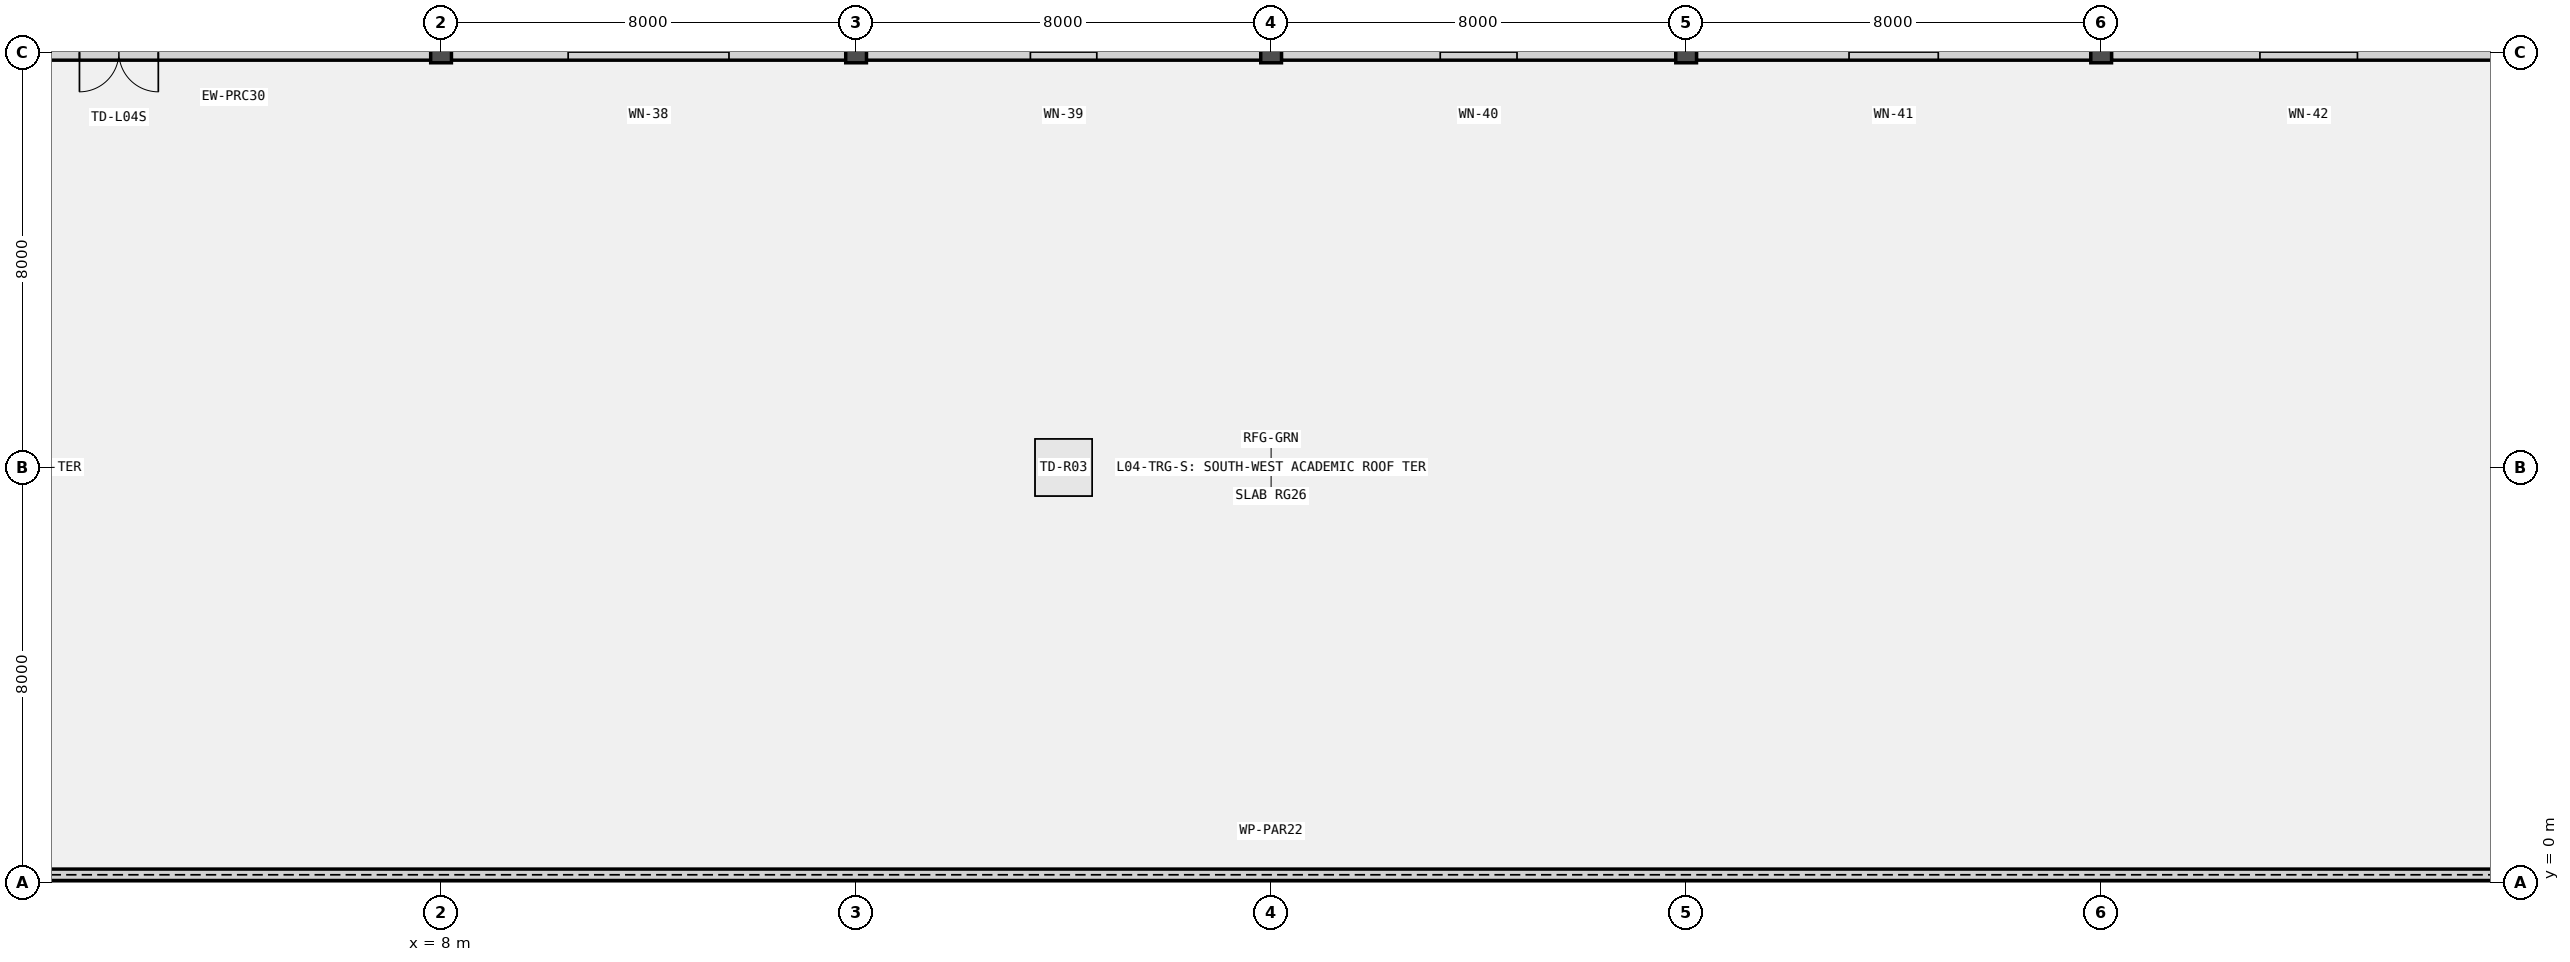
"""IFC4 building model, lengths in metres.
Left out: names, types, materials, properties, quantities, classifications, styles, units other than length and angle.
Written with IfcOpenShell. Run it as: python <this file> out.ifc"""

import sys

from ifc_helpers import new_model, si_unit, direction, frame, frame_2d, origin, origin_2d, place, context, subcontext, project, spatial, rectangle, extrude, element, fill, save


model = new_model("IFC4")
c1 = context("Model", 3, precision=1e-05, world=origin(), true_north=direction((0.0, 1.0)))
c2 = subcontext(c1, "Body", "Model", "MODEL_VIEW")
j1 = project(units=[si_unit("LENGTHUNIT", "METRE"), si_unit("PLANEANGLEUNIT", "RADIAN")], contexts=[c1])
p1 = place(None, origin())
s1 = spatial("IfcSite", under=j1, at=p1, CompositionType="ELEMENT")
p2 = place(p1, origin())
s2 = spatial("IfcBuilding", under=s1, at=p2, CompositionType="ELEMENT")
p3 = place(p2, frame((0.0, 0.0, 18.0)))
s3 = spatial("IfcBuildingStorey", under=s2, at=p3, CompositionType="ELEMENT", Elevation=18.0)
for number, where, z_axis, x_axis in (
    (1, (8.0, 16.0, 0.0), (0.0, 0.0, 1.0), (1.0, 0.0, 0.0)),
    (2, (16.0, 16.0, 0.0), (0.0, 0.0, 1.0), (1.0, 0.0, 0.0)),
    (3, (24.0, 16.0, 0.0), (0.0, 0.0, 1.0), (1.0, 0.0, 0.0)),
    (4, (32.0, 16.0, 0.0), (0.0, 0.0, 1.0), (1.0, 0.0, 0.0)),
    (5, (40.0, 16.0, 0.0), (0.0, 0.0, 1.0), (1.0, 0.0, 0.0)),
):
    element("IfcColumn", number, at=place(p3, frame(where, z_axis=z_axis, x_axis=x_axis)), inside=s3, PredefinedType="COLUMN", context=c2, shape_type="SweptSolid", body=[
        extrude(rectangle(XDim=0.4, YDim=0.4, at=origin_2d()), origin(), (0.0, 0.0, 1.0), 3.6),
    ])
p4 = place(p3, frame((7.802, 16.0, 0.0), z_axis=(0.0, 0.0, 1.0), x_axis=(-1.0, 0.0, 0.0)))
e6 = element("IfcWall", 6, at=p4, inside=s3, PredefinedType="SOLIDWALL", context=c2, shape_type="SweptSolid", body=[
    extrude(rectangle(XDim=7.604, YDim=0.3, at=frame_2d((3.802, 0.0))), origin(), (0.0, 0.0, 1.0), 2.82),
])
p5 = place(p4, frame((5.252, 0.0, 0.0)))
e7 = element("IfcOpeningElement", 7, at=p5, cuts=e6, PredefinedType="OPENING", context=c2, shape_type="SweptSolid", body=[
    extrude(rectangle(XDim=1.52, YDim=2.2, at=frame_2d((0.76, 1.1))), frame((0.0, 0.16, 0.0), z_axis=(0.0, -1.0, 0.0), x_axis=(1.0, 0.0, 0.0)), (0.0, 0.0, 1.0), 0.32),
])
p6 = place(p3, frame((15.802, 16.0, 0.0), z_axis=(0.0, 0.0, 1.0), x_axis=(-1.0, 0.0, 0.0)))
e8 = element("IfcWall", 8, at=p6, inside=s3, PredefinedType="SOLIDWALL", context=c2, shape_type="SweptSolid", body=[
    extrude(rectangle(XDim=7.604, YDim=0.3, at=frame_2d((3.802, 0.0))), origin(), (0.0, 0.0, 1.0), 2.82),
])
p7 = place(p6, frame((2.252, 0.0, 0.88)))
e9 = element("IfcOpeningElement", 9, at=p7, cuts=e8, PredefinedType="OPENING", context=c2, shape_type="SweptSolid", body=[
    extrude(rectangle(XDim=3.1, YDim=1.6, at=frame_2d((1.55, 0.8))), frame((0.0, 0.16, 0.0), z_axis=(0.0, -1.0, 0.0), x_axis=(1.0, 0.0, 0.0)), (0.0, 0.0, 1.0), 0.32),
])
p8 = place(p3, frame((23.802, 16.0, 0.0), z_axis=(0.0, 0.0, 1.0), x_axis=(-1.0, 0.0, 0.0)))
e10 = element("IfcWall", 10, at=p8, inside=s3, PredefinedType="SOLIDWALL", context=c2, shape_type="SweptSolid", body=[
    extrude(rectangle(XDim=7.604, YDim=0.3, at=frame_2d((3.802, 0.0))), origin(), (0.0, 0.0, 1.0), 2.82),
])
p9 = place(p8, frame((3.162, 0.0, 0.88)))
e11 = element("IfcOpeningElement", 11, at=p9, cuts=e10, PredefinedType="OPENING", context=c2, shape_type="SweptSolid", body=[
    extrude(rectangle(XDim=1.28, YDim=1.52, at=frame_2d((0.64, 0.76))), frame((0.0, 0.16, 0.0), z_axis=(0.0, -1.0, 0.0), x_axis=(1.0, 0.0, 0.0)), (0.0, 0.0, 1.0), 0.32),
])
p10 = place(p3, frame((31.802, 16.0, 0.0), z_axis=(0.0, 0.0, 1.0), x_axis=(-1.0, 0.0, 0.0)))
e12 = element("IfcWall", 12, at=p10, inside=s3, PredefinedType="SOLIDWALL", context=c2, shape_type="SweptSolid", body=[
    extrude(rectangle(XDim=7.604, YDim=0.3, at=frame_2d((3.802, 0.0))), origin(), (0.0, 0.0, 1.0), 2.82),
])
p11 = place(p10, frame((3.062, 0.0, 0.88)))
e13 = element("IfcOpeningElement", 13, at=p11, cuts=e12, PredefinedType="OPENING", context=c2, shape_type="SweptSolid", body=[
    extrude(rectangle(XDim=1.48, YDim=1.58, at=frame_2d((0.74, 0.79))), frame((0.0, 0.16, 0.0), z_axis=(0.0, -1.0, 0.0), x_axis=(1.0, 0.0, 0.0)), (0.0, 0.0, 1.0), 0.32),
])
p12 = place(p3, frame((39.802, 16.0, 0.0), z_axis=(0.0, 0.0, 1.0), x_axis=(-1.0, 0.0, 0.0)))
e14 = element("IfcWall", 14, at=p12, inside=s3, PredefinedType="SOLIDWALL", context=c2, shape_type="SweptSolid", body=[
    extrude(rectangle(XDim=7.604, YDim=0.3, at=frame_2d((3.802, 0.0))), origin(), (0.0, 0.0, 1.0), 2.82),
])
p13 = place(p12, frame((2.942, 0.0, 0.88)))
e15 = element("IfcOpeningElement", 15, at=p13, cuts=e14, PredefinedType="OPENING", context=c2, shape_type="SweptSolid", body=[
    extrude(rectangle(XDim=1.72, YDim=1.62, at=frame_2d((0.86, 0.81))), frame((0.0, 0.16, 0.0), z_axis=(0.0, -1.0, 0.0), x_axis=(1.0, 0.0, 0.0)), (0.0, 0.0, 1.0), 0.32),
])
p14 = place(p3, frame((47.802, 16.0, 0.0), z_axis=(0.0, 0.0, 1.0), x_axis=(-1.0, 0.0, 0.0)))
e16 = element("IfcWall", 16, at=p14, inside=s3, PredefinedType="SOLIDWALL", context=c2, shape_type="SweptSolid", body=[
    extrude(rectangle(XDim=7.604, YDim=0.3, at=frame_2d((3.802, 0.0))), origin(), (0.0, 0.0, 1.0), 2.82),
])
p15 = place(p14, frame((2.862, 0.0, 0.88)))
e17 = element("IfcOpeningElement", 17, at=p15, cuts=e16, PredefinedType="OPENING", context=c2, shape_type="SweptSolid", body=[
    extrude(rectangle(XDim=1.88, YDim=1.68, at=frame_2d((0.94, 0.84))), frame((0.0, 0.16, 0.0), z_axis=(0.0, -1.0, 0.0), x_axis=(1.0, 0.0, 0.0)), (0.0, 0.0, 1.0), 0.32),
])
p16 = place(p3, frame((47.85, 0.15, 0.0), z_axis=(0.0, 0.0, 1.0), x_axis=(-1.0, 0.0, 0.0)))
e18 = element("IfcWall", 18, at=p16, inside=s3, PredefinedType="PARAPET", context=c2, shape_type="SweptSolid", body=[
    extrude(rectangle(XDim=47.7, YDim=0.22, at=frame_2d((23.85, 0.0))), origin(), (0.0, 0.0, 1.0), 1.15),
])
p17 = place(p5, origin())
e19 = element("IfcDoor", 19, at=p17, inside=s3, OperationType="DOUBLE_DOOR_SINGLE_SWING", PredefinedType="DOOR", context=c2, shape_type="SweptSolid", body=[
    extrude(rectangle(XDim=1.52, YDim=2.2, at=frame_2d((0.76, 1.1))), frame((0.0, 0.025, 0.0), z_axis=(0.0, -1.0, 0.0), x_axis=(1.0, 0.0, 0.0)), (0.0, 0.0, 1.0), 0.05),
])
fill(e7, e19)
p18 = place(p7, origin())
e20 = element("IfcWindow", 20, at=p18, inside=s3, PartitioningType="SINGLE_PANEL", PredefinedType="WINDOW", context=c2, shape_type="SweptSolid", body=[
    extrude(rectangle(XDim=3.1, YDim=1.6, at=frame_2d((1.55, 0.8))), frame((0.0, 0.03, 0.0), z_axis=(0.0, -1.0, 0.0), x_axis=(1.0, 0.0, 0.0)), (0.0, 0.0, 1.0), 0.06),
])
fill(e9, e20)
p19 = place(p9, origin())
e21 = element("IfcWindow", 21, at=p19, inside=s3, PartitioningType="SINGLE_PANEL", PredefinedType="WINDOW", context=c2, shape_type="SweptSolid", body=[
    extrude(rectangle(XDim=1.28, YDim=1.52, at=frame_2d((0.64, 0.76))), frame((0.0, 0.03, 0.0), z_axis=(0.0, -1.0, 0.0), x_axis=(1.0, 0.0, 0.0)), (0.0, 0.0, 1.0), 0.06),
])
fill(e11, e21)
p20 = place(p11, origin())
e22 = element("IfcWindow", 22, at=p20, inside=s3, PartitioningType="SINGLE_PANEL", PredefinedType="WINDOW", context=c2, shape_type="SweptSolid", body=[
    extrude(rectangle(XDim=1.48, YDim=1.58, at=frame_2d((0.74, 0.79))), frame((0.0, 0.03, 0.0), z_axis=(0.0, -1.0, 0.0), x_axis=(1.0, 0.0, 0.0)), (0.0, 0.0, 1.0), 0.06),
])
fill(e13, e22)
p21 = place(p13, origin())
e23 = element("IfcWindow", 23, at=p21, inside=s3, PartitioningType="SINGLE_PANEL", PredefinedType="WINDOW", context=c2, shape_type="SweptSolid", body=[
    extrude(rectangle(XDim=1.72, YDim=1.62, at=frame_2d((0.86, 0.81))), frame((0.0, 0.03, 0.0), z_axis=(0.0, -1.0, 0.0), x_axis=(1.0, 0.0, 0.0)), (0.0, 0.0, 1.0), 0.06),
])
fill(e15, e23)
p22 = place(p15, origin())
e24 = element("IfcWindow", 24, at=p22, inside=s3, PartitioningType="SINGLE_PANEL", PredefinedType="WINDOW", context=c2, shape_type="SweptSolid", body=[
    extrude(rectangle(XDim=1.88, YDim=1.68, at=frame_2d((0.94, 0.84))), frame((0.0, 0.03, 0.0), z_axis=(0.0, -1.0, 0.0), x_axis=(1.0, 0.0, 0.0)), (0.0, 0.0, 1.0), 0.06),
])
fill(e17, e24)
p23 = place(p3, frame((0.0, 0.0, -0.26)))
p24 = place(p23, frame((20.0, 8.0, 0.0)))
p25 = place(p24, frame((0.0, 0.0, 0.21)))
e25 = element("IfcDoor", 25, at=p25, inside=s3, OperationType="SINGLE_SWING_LEFT", PredefinedType="TRAPDOOR", context=c2, shape_type="SweptSolid", body=[
    extrude(rectangle(XDim=1.1, YDim=1.1, at=origin_2d()), origin(), (0.0, 0.0, 1.0), 0.05),
])
save(model, sys.argv[1])
